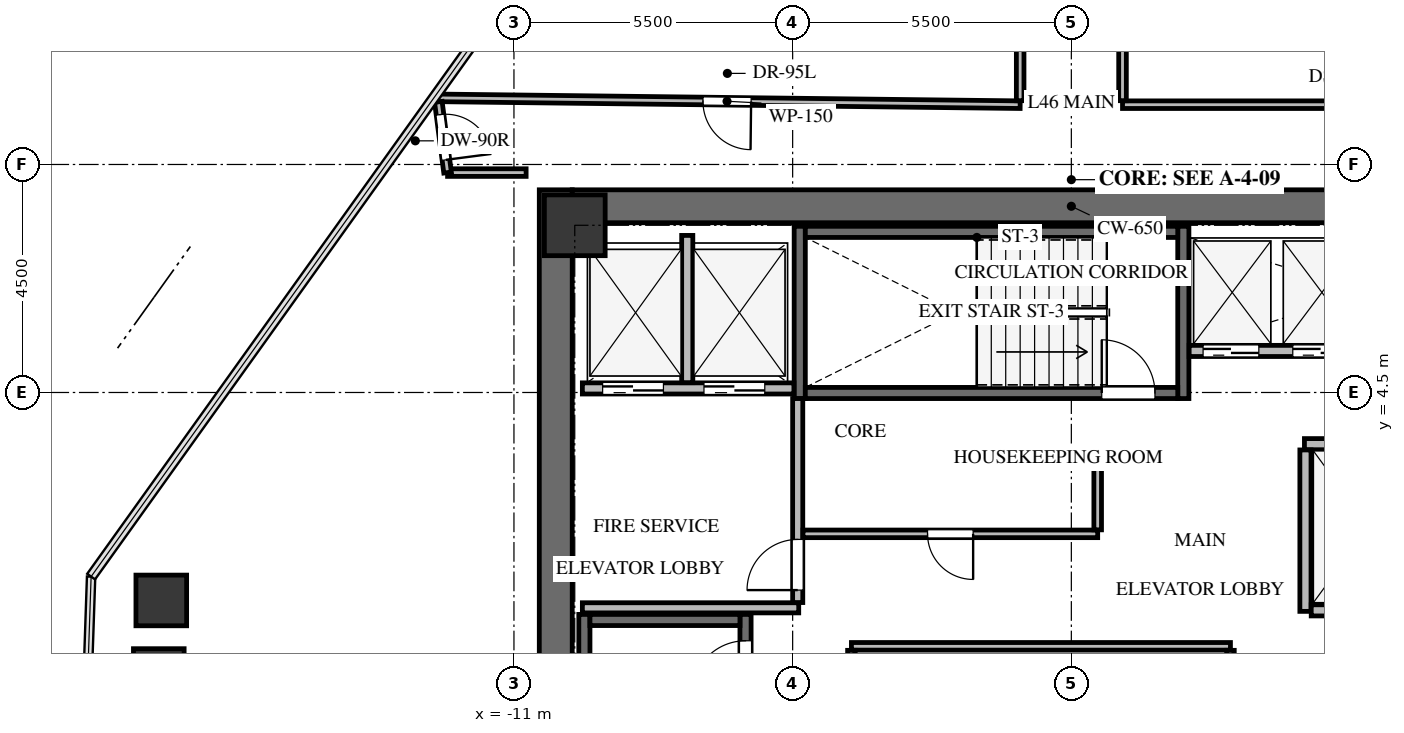
"""IFC4 building model, lengths in metres.
Left out: names, types, materials, properties, quantities, classifications, styles, units other than length and angle.
Written with IfcOpenShell. Run it as: python <this file> out.ifc"""

import sys

from ifc_helpers import new_model, si_unit, direction, frame, frame_2d, origin, origin_2d, place, context, subcontext, project, spatial, rectangle, extrude, source, transform, mapped, element, fill, save


model = new_model("IFC4")
c1 = context("Model", 3, precision=1e-05, world=origin(), true_north=direction((0.0, 1.0)))
c2 = subcontext(c1, "Body", "Model", "MODEL_VIEW")
j1 = project(units=[si_unit("LENGTHUNIT", "METRE"), si_unit("PLANEANGLEUNIT", "RADIAN")], contexts=[c1])
p1 = place(None, origin())
s1 = spatial("IfcSite", under=j1, at=p1, CompositionType="ELEMENT")
p2 = place(p1, origin())
s2 = spatial("IfcBuilding", under=s1, at=p2, CompositionType="ELEMENT")
p3 = place(p2, frame((0.0, 0.0, 170.5)))
s3 = spatial("IfcBuildingStorey", under=s2, at=p3, CompositionType="ELEMENT", Elevation=170.5)
p4 = place(p3, frame((-10.175, -8.5, 0.0), z_axis=(0.0, 0.0, 1.0), x_axis=(0.0, 1.0, 0.0)))
e1 = element("IfcWall", 1, at=p4, inside=s3, PredefinedType="SHEAR", context=c2, shape_type="SweptSolid", body=[
    extrude(rectangle(XDim=17.0, YDim=0.65, at=frame_2d((8.5, 0.0))), origin(), (0.0, 0.0, 1.0), 3.3),
])
p5 = place(p3, frame((-9.85, 8.175, 0.0), z_axis=(0.0, 0.0, 1.0), x_axis=(1.0, 0.0, 0.0)))
e2 = element("IfcWall", 2, at=p5, inside=s3, PredefinedType="SHEAR", context=c2, shape_type="SweptSolid", body=[
    extrude(rectangle(XDim=19.7, YDim=0.65, at=frame_2d((9.85, 0.0))), origin(), (0.0, 0.0, 1.0), 3.3),
])
p6 = place(p3, frame((-6.43, -7.77, -0.24), z_axis=(0.0, 0.0, 1.0), x_axis=(0.0, 1.0, 0.0)))
e3 = element("IfcWall", 3, at=p6, inside=s3, PredefinedType="SHEAR", context=c2, shape_type="SweptSolid", body=[
    extrude(rectangle(XDim=7.89, YDim=0.22, at=frame_2d((3.945, 0.0))), origin(), (0.0, 0.0, 1.0), 3.3),
])
p7 = place(p6, frame((6.32, 0.0, 0.0)))
e4 = element("IfcOpeningElement", 4, at=p7, cuts=e3, PredefinedType="OPENING", context=c2, shape_type="SweptSolid", body=[
    extrude(rectangle(XDim=1.05, YDim=2.15, at=frame_2d((0.525, 1.075))), frame((0.0, 0.12, 0.0), z_axis=(0.0, -1.0, 0.0), x_axis=(1.0, 0.0, 0.0)), (0.0, 0.0, 1.0), 0.24),
])
p8 = place(p3, frame((-9.61, 0.12, -0.24), z_axis=(0.0, 0.0, 1.0), x_axis=(0.0, -1.0, 0.0)))
e5 = element("IfcWall", 5, at=p8, inside=s3, PredefinedType="SHEAR", context=c2, shape_type="SweptSolid", body=[
    extrude(rectangle(XDim=7.89, YDim=0.22, at=frame_2d((3.945, 0.0))), origin(), (0.0, 0.0, 1.0), 3.3),
])
p9 = place(p3, frame((-6.54, 0.01, -0.24), z_axis=(0.0, 0.0, 1.0), x_axis=(-1.0, 0.0, 0.0)))
e6 = element("IfcWall", 6, at=p9, inside=s3, PredefinedType="SHEAR", context=c2, shape_type="SweptSolid", body=[
    extrude(rectangle(XDim=2.96, YDim=0.22, at=frame_2d((1.48, 0.0))), origin(), (0.0, 0.0, 1.0), 3.3),
])
for number, where, z_axis, x_axis in (
    (7, (2.21, 4.38, -0.24), (0.0, 0.0, 1.0), (0.0, 1.0, 0.0)),
    (8, (-5.36, 7.78, -0.24), (0.0, 0.0, 1.0), (0.0, -1.0, 0.0)),
):
    element("IfcWall", number, at=place(p3, frame(where, z_axis=z_axis, x_axis=x_axis)), inside=s3, PredefinedType="SHEAR", context=c2, shape_type="SweptSolid", body=[
        extrude(rectangle(XDim=3.4, YDim=0.22, at=frame_2d((1.7, 0.0))), origin(), (0.0, 0.0, 1.0), 3.3),
    ])
p10 = place(p3, frame((-5.25, 4.49, -0.24), z_axis=(0.0, 0.0, 1.0), x_axis=(1.0, 0.0, 0.0)))
e9 = element("IfcWall", 9, at=p10, inside=s3, PredefinedType="SHEAR", context=c2, shape_type="SweptSolid", body=[
    extrude(rectangle(XDim=7.35, YDim=0.22, at=frame_2d((3.675, 0.0))), origin(), (0.0, 0.0, 1.0), 3.3),
])
p11 = place(p10, frame((5.85, 0.0, 0.0)))
e10 = element("IfcOpeningElement", 10, at=p11, cuts=e9, PredefinedType="OPENING", context=c2, shape_type="SweptSolid", body=[
    extrude(rectangle(XDim=1.05, YDim=2.15, at=frame_2d((0.525, 1.075))), frame((0.0, 0.12, 0.0), z_axis=(0.0, -1.0, 0.0), x_axis=(1.0, 0.0, 0.0)), (0.0, 0.0, 1.0), 0.24),
])
p12 = place(p3, frame((2.1, 7.67, -0.24), z_axis=(0.0, 0.0, 1.0), x_axis=(-1.0, 0.0, 0.0)))
e11 = element("IfcWall", 11, at=p12, inside=s3, PredefinedType="SHEAR", context=c2, shape_type="SweptSolid", body=[
    extrude(rectangle(XDim=7.35, YDim=0.22, at=frame_2d((3.675, 0.0))), origin(), (0.0, 0.0, 1.0), 3.3),
])
m1 = source(origin(), c2, "Body", "SweptSolid", [
    extrude(rectangle(XDim=1.2, YDim=1.2, at=origin_2d()), origin(), (0.0, 0.0, 1.0), 3.3),
])
p13 = place(p3, frame((-9.8, 7.8, -0.24), z_axis=(0.0, 0.0, 1.0), x_axis=(1.0, 0.0, 0.0)))
e12 = element("IfcColumn", 12, at=p13, inside=s3, PredefinedType="COLUMN", context=c2, shape_type="MappedRepresentation", body=[
    mapped(m1, transform((0.0, 0.0, 0.0), x_axis=(1.0, 0.0, 0.0), y_axis=(0.0, 1.0, 0.0), z_axis=(0.0, 0.0, 1.0), scale=1.0)),
])
m2 = source(origin(), c2, "Body", "SweptSolid", [
    extrude(rectangle(XDim=1.0, YDim=1.0, at=origin_2d()), origin(), (0.0, 0.0, 1.0), 3.3),
])
for number, where, z_axis, x_axis in (
    (13, (-18.009, -1.057, -0.24), (0.0, 0.0, 1.0), (1.0, 0.0, 0.0)),
    (14, (-17.96, 0.396, -0.24), (0.0, 0.0, 1.0), (1.0, 0.0, 0.0)),
):
    element("IfcColumn", number, at=place(p3, frame(where, z_axis=z_axis, x_axis=x_axis)), inside=s3, PredefinedType="COLUMN", context=c2, shape_type="MappedRepresentation", body=[
        mapped(m2, transform((0.0, 0.0, 0.0), x_axis=(1.0, 0.0, 0.0), y_axis=(0.0, 1.0, 0.0), z_axis=(0.0, 0.0, 1.0), scale=1.0)),
    ])
p14 = place(p3, frame((-9.65, 4.58, 0.0), z_axis=(0.0, 0.0, 1.0), x_axis=(1.0, 0.0, 0.0)))
e15 = element("IfcWall", 15, at=p14, inside=s3, PredefinedType="SOLIDWALL", context=c2, shape_type="SweptSolid", body=[
    extrude(rectangle(XDim=4.175, YDim=0.22, at=frame_2d((2.087, 0.0))), origin(), (0.0, 0.0, 1.0), 3.045),
])
p15 = place(p14, frame((0.4, 0.0, 0.0)))
e16 = element("IfcOpeningElement", 16, at=p15, cuts=e15, PredefinedType="OPENING", context=c2, shape_type="SweptSolid", body=[
    extrude(rectangle(XDim=1.2, YDim=2.15, at=frame_2d((0.6, 1.075))), frame((0.0, 0.12, 0.0), z_axis=(0.0, -1.0, 0.0), x_axis=(1.0, 0.0, 0.0)), (0.0, 0.0, 1.0), 0.24),
])
p16 = place(p14, frame((2.4, 0.0, 0.0)))
e17 = element("IfcOpeningElement", 17, at=p16, cuts=e15, PredefinedType="OPENING", context=c2, shape_type="SweptSolid", body=[
    extrude(rectangle(XDim=1.2, YDim=2.15, at=frame_2d((0.6, 1.075))), frame((0.0, 0.12, 0.0), z_axis=(0.0, -1.0, 0.0), x_axis=(1.0, 0.0, 0.0)), (0.0, 0.0, 1.0), 0.24),
])
p17 = place(p3, frame((-7.58, 4.694, 0.0), z_axis=(0.0, 0.0, 1.0), x_axis=(0.0, 1.0, 0.0)))
e18 = element("IfcWall", 18, at=p17, inside=s3, PredefinedType="SOLIDWALL", context=c2, shape_type="SweptSolid", body=[
    extrude(rectangle(XDim=2.906, YDim=0.22, at=frame_2d((1.453, 0.0))), origin(), (0.0, 0.0, 1.0), 3.045),
])
p18 = place(p3, frame((-9.65, 0.25, 0.0), z_axis=(0.0, 0.0, 1.0), x_axis=(1.0, 0.0, 0.0)))
e19 = element("IfcWall", 19, at=p18, inside=s3, PredefinedType="SOLIDWALL", context=c2, shape_type="SweptSolid", body=[
    extrude(rectangle(XDim=4.27, YDim=0.2, at=frame_2d((2.135, 0.0))), origin(), (0.0, 0.0, 1.0), 3.045),
])
p19 = place(p3, frame((-5.4, 0.354, 0.0), z_axis=(0.0, 0.0, 1.0), x_axis=(0.0, 1.0, 0.0)))
e20 = element("IfcWall", 20, at=p19, inside=s3, PredefinedType="SOLIDWALL", context=c2, shape_type="SweptSolid", body=[
    extrude(rectangle(XDim=4.026, YDim=0.2, at=frame_2d((2.013, 0.0))), origin(), (0.0, 0.0, 1.0), 3.045),
])
p20 = place(p19, frame((0.246, 0.0, 0.0)))
e21 = element("IfcOpeningElement", 21, at=p20, cuts=e20, PredefinedType="OPENING", context=c2, shape_type="SweptSolid", body=[
    extrude(rectangle(XDim=1.0, YDim=2.15, at=frame_2d((0.5, 1.075))), frame((0.0, 0.11, 0.0), z_axis=(0.0, -1.0, 0.0), x_axis=(1.0, 0.0, 0.0)), (0.0, 0.0, 1.0), 0.22),
])
p21 = place(p3, frame((4.6, 3.48, 0.0), z_axis=(0.0, 0.0, 1.0), x_axis=(1.0, 0.0, 0.0)))
e22 = element("IfcWall", 22, at=p21, inside=s3, PredefinedType="SOLIDWALL", context=c2, shape_type="SweptSolid", body=[
    extrude(rectangle(XDim=5.05, YDim=0.22, at=frame_2d((2.525, 0.0))), origin(), (0.0, 0.0, 1.0), 3.045),
])
p22 = place(p21, frame((0.55, 0.0, 0.0)))
e23 = element("IfcOpeningElement", 23, at=p22, cuts=e22, PredefinedType="OPENING", context=c2, shape_type="SweptSolid", body=[
    extrude(rectangle(XDim=1.4, YDim=2.15, at=frame_2d((0.7, 1.075))), frame((0.0, 0.12, 0.0), z_axis=(0.0, -1.0, 0.0), x_axis=(1.0, 0.0, 0.0)), (0.0, 0.0, 1.0), 0.24),
])
p23 = place(p21, frame((3.05, 0.0, 0.0)))
e24 = element("IfcOpeningElement", 24, at=p23, cuts=e22, PredefinedType="OPENING", context=c2, shape_type="SweptSolid", body=[
    extrude(rectangle(XDim=1.4, YDim=2.15, at=frame_2d((0.7, 1.075))), frame((0.0, 0.12, 0.0), z_axis=(0.0, -1.0, 0.0), x_axis=(1.0, 0.0, 0.0)), (0.0, 0.0, 1.0), 0.24),
])
p24 = place(p3, frame((4.62, 0.18, 0.0), z_axis=(0.0, 0.0, 1.0), x_axis=(0.0, 1.0, 0.0)))
e25 = element("IfcWall", 25, at=p24, inside=s3, PredefinedType="SOLIDWALL", context=c2, shape_type="SweptSolid", body=[
    extrude(rectangle(XDim=3.186, YDim=0.22, at=frame_2d((1.593, 0.0))), origin(), (0.0, 0.0, 1.0), 3.045),
])
p25 = place(p3, frame((4.734, 0.2, 0.0), z_axis=(0.0, 0.0, 1.0), x_axis=(1.0, 0.0, 0.0)))
e26 = element("IfcWall", 26, at=p25, inside=s3, PredefinedType="SOLIDWALL", context=c2, shape_type="SweptSolid", body=[
    extrude(rectangle(XDim=1.666, YDim=0.22, at=frame_2d((0.833, 0.0))), origin(), (0.0, 0.0, 1.0), 3.045),
])
p26 = place(p3, frame((2.325, 5.32, 0.0), z_axis=(0.0, 0.0, 1.0), x_axis=(1.0, 0.0, 0.0)))
e27 = element("IfcWall", 27, at=p26, inside=s3, PredefinedType="SOLIDWALL", context=c2, shape_type="SweptSolid", body=[
    extrude(rectangle(XDim=7.325, YDim=0.22, at=frame_2d((3.663, 0.0))), origin(), (0.0, 0.0, 1.0), 3.045),
])
p27 = place(p26, frame((0.275, 0.0, 0.0)))
e28 = element("IfcOpeningElement", 28, at=p27, cuts=e27, PredefinedType="OPENING", context=c2, shape_type="SweptSolid", body=[
    extrude(rectangle(XDim=1.1, YDim=2.15, at=frame_2d((0.55, 1.075))), frame((0.0, 0.12, 0.0), z_axis=(0.0, -1.0, 0.0), x_axis=(1.0, 0.0, 0.0)), (0.0, 0.0, 1.0), 0.24),
])
p28 = place(p26, frame((2.045, 0.0, 0.0)))
e29 = element("IfcOpeningElement", 29, at=p28, cuts=e27, PredefinedType="OPENING", context=c2, shape_type="SweptSolid", body=[
    extrude(rectangle(XDim=1.1, YDim=2.15, at=frame_2d((0.55, 1.075))), frame((0.0, 0.12, 0.0), z_axis=(0.0, -1.0, 0.0), x_axis=(1.0, 0.0, 0.0)), (0.0, 0.0, 1.0), 0.24),
])
p29 = place(p26, frame((3.815, 0.0, 0.0)))
e30 = element("IfcOpeningElement", 30, at=p29, cuts=e27, PredefinedType="OPENING", context=c2, shape_type="SweptSolid", body=[
    extrude(rectangle(XDim=1.1, YDim=2.15, at=frame_2d((0.55, 1.075))), frame((0.0, 0.12, 0.0), z_axis=(0.0, -1.0, 0.0), x_axis=(1.0, 0.0, 0.0)), (0.0, 0.0, 1.0), 0.24),
])
p30 = place(p26, frame((5.585, 0.0, 0.0)))
e31 = element("IfcOpeningElement", 31, at=p30, cuts=e27, PredefinedType="OPENING", context=c2, shape_type="SweptSolid", body=[
    extrude(rectangle(XDim=1.1, YDim=2.15, at=frame_2d((0.55, 1.075))), frame((0.0, 0.12, 0.0), z_axis=(0.0, -1.0, 0.0), x_axis=(1.0, 0.0, 0.0)), (0.0, 0.0, 1.0), 0.24),
])
p31 = place(p3, frame((-4.34, -0.51, 0.0), z_axis=(0.0, 0.0, 1.0), x_axis=(1.0, 0.0, 0.0)))
e32 = element("IfcWall", 32, at=p31, inside=s3, PredefinedType="PARTITIONING", context=c2, shape_type="SweptSolid", body=[
    extrude(rectangle(XDim=7.48, YDim=0.15, at=frame_2d((3.74, 0.0))), origin(), (0.0, 0.0, 1.0), 3.045),
])
for number, where, z_axis, x_axis in (
    (33, (-4.34, -2.961, 0.0), (0.0, 0.0, 1.0), (0.0, 1.0, 0.0)),
    (34, (3.14, -0.589, 0.0), (0.0, 0.0, 1.0), (0.0, -1.0, 0.0)),
):
    element("IfcWall", number, at=place(p3, frame(where, z_axis=z_axis, x_axis=x_axis)), inside=s3, PredefinedType="PARTITIONING", context=c2, shape_type="SweptSolid", body=[
        extrude(rectangle(XDim=2.372, YDim=0.15, at=frame_2d((1.186, 0.0))), origin(), (0.0, 0.0, 1.0), 3.045),
    ])
p32 = place(p3, frame((0.52, 1.71, 0.0), z_axis=(0.0, 0.0, 1.0), x_axis=(-1.0, 0.0, 0.0)))
e35 = element("IfcWall", 35, at=p32, inside=s3, PredefinedType="PARTITIONING", context=c2, shape_type="SweptSolid", body=[
    extrude(rectangle(XDim=5.816, YDim=0.15, at=frame_2d((2.908, 0.0))), origin(), (0.0, 0.0, 1.0), 3.045),
])
p33 = place(p32, frame((2.458, 0.0, 0.0)))
e36 = element("IfcOpeningElement", 36, at=p33, cuts=e35, PredefinedType="OPENING", context=c2, shape_type="SweptSolid", body=[
    extrude(rectangle(XDim=0.9, YDim=2.05, at=frame_2d((0.45, 1.025))), frame((0.0, 0.085, 0.0), z_axis=(0.0, -1.0, 0.0), x_axis=(1.0, 0.0, 0.0)), (0.0, 0.0, 1.0), 0.17),
])
p34 = place(p3, frame((0.52, 3.3, 0.0), z_axis=(0.0, 0.0, 1.0), x_axis=(0.0, -1.0, 0.0)))
e37 = element("IfcWall", 37, at=p34, inside=s3, PredefinedType="PARTITIONING", context=c2, shape_type="SweptSolid", body=[
    extrude(rectangle(XDim=1.511, YDim=0.15, at=frame_2d((0.755, 0.0))), origin(), (0.0, 0.0, 1.0), 3.045),
])
p35 = place(p3, frame((-1.01, 10.18, 0.0), z_axis=(0.0, 0.0, 1.0), x_axis=(-0.999931176304, 0.011732120664, 0.0)))
e38 = element("IfcWall", 38, at=p35, inside=s3, PredefinedType="PARTITIONING", context=c2, shape_type="SweptSolid", body=[
    extrude(rectangle(XDim=11.57, YDim=0.15, at=frame_2d((5.785, 0.0))), origin(), (0.0, 0.0, 1.0), 2.242),
])
p36 = place(p35, frame((5.31, 0.0, 0.0)))
e39 = element("IfcOpeningElement", 39, at=p36, cuts=e38, PredefinedType="OPENING", context=c2, shape_type="SweptSolid", body=[
    extrude(rectangle(XDim=0.95, YDim=2.1, at=frame_2d((0.475, 1.05))), frame((0.0, 0.085, 0.0), z_axis=(0.0, -1.0, 0.0), x_axis=(1.0, 0.0, 0.0)), (0.0, 0.0, 1.0), 0.17),
])
p37 = place(p3, frame((-1.01, 16.418, 0.0), z_axis=(0.0, 0.0, 1.0), x_axis=(0.0, -1.0, 0.0)))
e40 = element("IfcWall", 40, at=p37, inside=s3, PredefinedType="PARTITIONING", context=c2, shape_type="SweptSolid", body=[
    extrude(rectangle(XDim=6.159, YDim=0.15, at=frame_2d((3.08, 0.0))), origin(), (0.0, 0.0, 1.0), 2.399),
])
p38 = place(p3, frame((12.26, 10.18, 0.0), z_axis=(0.0, 0.0, 1.0), x_axis=(-1.0, 0.0, 0.0)))
e41 = element("IfcWall", 41, at=p38, inside=s3, PredefinedType="PARTITIONING", context=c2, shape_type="SweptSolid", body=[
    extrude(rectangle(XDim=11.25, YDim=0.15, at=frame_2d((5.625, 0.0))), origin(), (0.0, 0.0, 1.0), 2.242),
])
p39 = place(p38, frame((4.825, 0.0, 0.0)))
e42 = element("IfcOpeningElement", 42, at=p39, cuts=e41, PredefinedType="OPENING", context=c2, shape_type="SweptSolid", body=[
    extrude(rectangle(XDim=1.6, YDim=2.15, at=frame_2d((0.8, 1.075))), frame((0.0, 0.085, 0.0), z_axis=(0.0, -1.0, 0.0), x_axis=(1.0, 0.0, 0.0)), (0.0, 0.0, 1.0), 0.17),
])
p40 = place(p3, frame((1.01, 10.259, 0.0), z_axis=(0.0, 0.0, 1.0), x_axis=(0.0, 1.0, 0.0)))
e43 = element("IfcWall", 43, at=p40, inside=s3, PredefinedType="PARTITIONING", context=c2, shape_type="SweptSolid", body=[
    extrude(rectangle(XDim=6.159, YDim=0.15, at=frame_2d((3.08, 0.0))), origin(), (0.0, 0.0, 1.0), 2.399),
])
p41 = place(p3, frame((-12.31, 8.84, 0.0), z_axis=(0.0, 0.0, 1.0), x_axis=(1.0, 0.0, 0.0)))
e44 = element("IfcWall", 44, at=p41, inside=s3, PredefinedType="PARTITIONING", context=c2, shape_type="SweptSolid", body=[
    extrude(rectangle(XDim=1.55, YDim=0.15, at=frame_2d((0.775, 0.0))), origin(), (0.0, 0.0, 1.0), 2.399),
])
p42 = place(p3, frame((-12.492, 10.236, 0.0), z_axis=(0.0, 0.0, 1.0), x_axis=(0.129413346452, -0.991590735011, 0.0)))
e45 = element("IfcWall", 45, at=p42, inside=s3, PredefinedType="PARTITIONING", context=c2, shape_type="SweptSolid", body=[
    extrude(rectangle(XDim=1.407, YDim=0.15, at=frame_2d((0.704, 0.0))), origin(), (0.0, 0.0, 1.0), 3.045),
])
p43 = place(p42, frame((0.254, 0.0, 0.0)))
e46 = element("IfcOpeningElement", 46, at=p43, cuts=e45, PredefinedType="OPENING", context=c2, shape_type="SweptSolid", body=[
    extrude(rectangle(XDim=0.9, YDim=2.05, at=frame_2d((0.45, 1.025))), frame((0.0, 0.085, 0.0), z_axis=(0.0, -1.0, 0.0), x_axis=(1.0, 0.0, 0.0)), (0.0, 0.0, 1.0), 0.17),
])
m3 = source(origin(), c2, "Body", "SweptSolid", [
    extrude(rectangle(XDim=1.05, YDim=2.15, at=frame_2d((0.525, 1.075))), frame((0.0, 0.025, 0.0), z_axis=(0.0, -1.0, 0.0), x_axis=(1.0, 0.0, 0.0)), (0.0, 0.0, 1.0), 0.05),
])
p44 = place(p7, origin())
e47 = element("IfcDoor", 47, at=p44, inside=s3, OperationType="SINGLE_SWING_LEFT", PredefinedType="DOOR", context=c2, shape_type="MappedRepresentation", body=[
    mapped(m3, transform((0.0, 0.0, 0.0), x_axis=(1.0, 0.0, 0.0), y_axis=(0.0, 1.0, 0.0), z_axis=(0.0, 0.0, 1.0), scale=1.0)),
])
fill(e4, e47)
p45 = place(p11, origin())
e48 = element("IfcDoor", 48, at=p45, inside=s3, OperationType="SINGLE_SWING_LEFT", PredefinedType="DOOR", context=c2, shape_type="MappedRepresentation", body=[
    mapped(m3, transform((0.0, 0.0, 0.0), x_axis=(1.0, 0.0, 0.0), y_axis=(0.0, 1.0, 0.0), z_axis=(0.0, 0.0, 1.0), scale=1.0)),
])
fill(e10, e48)
m4 = source(origin(), c2, "Body", "SweptSolid", [
    extrude(rectangle(XDim=1.2, YDim=2.15, at=frame_2d((0.6, 1.075))), frame((0.0, 0.025, 0.0), z_axis=(0.0, -1.0, 0.0), x_axis=(1.0, 0.0, 0.0)), (0.0, 0.0, 1.0), 0.05),
])
p46 = place(p15, origin())
e49 = element("IfcDoor", 49, at=p46, inside=s3, OperationType="DOUBLE_DOOR_SLIDING", PredefinedType="DOOR", context=c2, shape_type="MappedRepresentation", body=[
    mapped(m4, transform((0.0, 0.0, 0.0), x_axis=(1.0, 0.0, 0.0), y_axis=(0.0, 1.0, 0.0), z_axis=(0.0, 0.0, 1.0), scale=1.0)),
])
fill(e16, e49)
p47 = place(p16, origin())
e50 = element("IfcDoor", 50, at=p47, inside=s3, OperationType="DOUBLE_DOOR_SLIDING", PredefinedType="DOOR", context=c2, shape_type="MappedRepresentation", body=[
    mapped(m4, transform((0.0, 0.0, 0.0), x_axis=(1.0, 0.0, 0.0), y_axis=(0.0, 1.0, 0.0), z_axis=(0.0, 0.0, 1.0), scale=1.0)),
])
fill(e17, e50)
m5 = source(origin(), c2, "Body", "SweptSolid", [
    extrude(rectangle(XDim=1.0, YDim=2.15, at=frame_2d((0.5, 1.075))), frame((0.0, 0.025, 0.0), z_axis=(0.0, -1.0, 0.0), x_axis=(1.0, 0.0, 0.0)), (0.0, 0.0, 1.0), 0.05),
])
p48 = place(p20, origin())
e51 = element("IfcDoor", 51, at=p48, inside=s3, OperationType="SINGLE_SWING_LEFT", PredefinedType="DOOR", context=c2, shape_type="MappedRepresentation", body=[
    mapped(m5, transform((0.0, 0.0, 0.0), x_axis=(1.0, 0.0, 0.0), y_axis=(0.0, 1.0, 0.0), z_axis=(0.0, 0.0, 1.0), scale=1.0)),
])
fill(e21, e51)
m6 = source(origin(), c2, "Body", "SweptSolid", [
    extrude(rectangle(XDim=1.1, YDim=2.15, at=frame_2d((0.55, 1.075))), frame((0.0, 0.025, 0.0), z_axis=(0.0, -1.0, 0.0), x_axis=(1.0, 0.0, 0.0)), (0.0, 0.0, 1.0), 0.05),
])
p49 = place(p27, origin())
e52 = element("IfcDoor", 52, at=p49, inside=s3, OperationType="DOUBLE_DOOR_SLIDING", PredefinedType="DOOR", context=c2, shape_type="MappedRepresentation", body=[
    mapped(m6, transform((0.0, 0.0, 0.0), x_axis=(1.0, 0.0, 0.0), y_axis=(0.0, 1.0, 0.0), z_axis=(0.0, 0.0, 1.0), scale=1.0)),
])
fill(e28, e52)
p50 = place(p28, origin())
e53 = element("IfcDoor", 53, at=p50, inside=s3, OperationType="DOUBLE_DOOR_SLIDING", PredefinedType="DOOR", context=c2, shape_type="MappedRepresentation", body=[
    mapped(m6, transform((0.0, 0.0, 0.0), x_axis=(1.0, 0.0, 0.0), y_axis=(0.0, 1.0, 0.0), z_axis=(0.0, 0.0, 1.0), scale=1.0)),
])
fill(e29, e53)
m7 = source(origin(), c2, "Body", "SweptSolid", [
    extrude(rectangle(XDim=0.9, YDim=2.05, at=frame_2d((0.45, 1.025))), frame((0.0, 0.025, 0.0), z_axis=(0.0, -1.0, 0.0), x_axis=(1.0, 0.0, 0.0)), (0.0, 0.0, 1.0), 0.05),
])
p51 = place(p33, origin())
e54 = element("IfcDoor", 54, at=p51, inside=s3, OperationType="SINGLE_SWING_LEFT", PredefinedType="DOOR", context=c2, shape_type="MappedRepresentation", body=[
    mapped(m7, transform((0.0, 0.0, 0.0), x_axis=(1.0, 0.0, 0.0), y_axis=(0.0, 1.0, 0.0), z_axis=(0.0, 0.0, 1.0), scale=1.0)),
])
fill(e36, e54)
m8 = source(origin(), c2, "Body", "SweptSolid", [
    extrude(rectangle(XDim=0.95, YDim=2.1, at=frame_2d((0.475, 1.05))), frame((0.0, 0.025, 0.0), z_axis=(0.0, -1.0, 0.0), x_axis=(1.0, 0.0, 0.0)), (0.0, 0.0, 1.0), 0.05),
])
p52 = place(p36, origin())
e55 = element("IfcDoor", 55, at=p52, inside=s3, OperationType="SINGLE_SWING_LEFT", PredefinedType="DOOR", context=c2, shape_type="MappedRepresentation", body=[
    mapped(m8, transform((0.0, 0.0, 0.0), x_axis=(1.0, 0.0, 0.0), y_axis=(0.0, 1.0, 0.0), z_axis=(0.0, 0.0, 1.0), scale=1.0)),
])
fill(e39, e55)
m9 = source(origin(), c2, "Body", "SweptSolid", [
    extrude(rectangle(XDim=0.9, YDim=2.05, at=frame_2d((0.45, 1.025))), frame((0.0, 0.025, 0.0), z_axis=(0.0, -1.0, 0.0), x_axis=(1.0, 0.0, 0.0)), (0.0, 0.0, 1.0), 0.05),
])
p53 = place(p43, origin())
e56 = element("IfcDoor", 56, at=p53, inside=s3, OperationType="SINGLE_SWING_RIGHT", PredefinedType="DOOR", context=c2, shape_type="MappedRepresentation", body=[
    mapped(m9, transform((0.0, 0.0, 0.0), x_axis=(1.0, 0.0, 0.0), y_axis=(0.0, 1.0, 0.0), z_axis=(0.0, 0.0, 1.0), scale=1.0)),
])
fill(e46, e56)
save(model, sys.argv[1])
